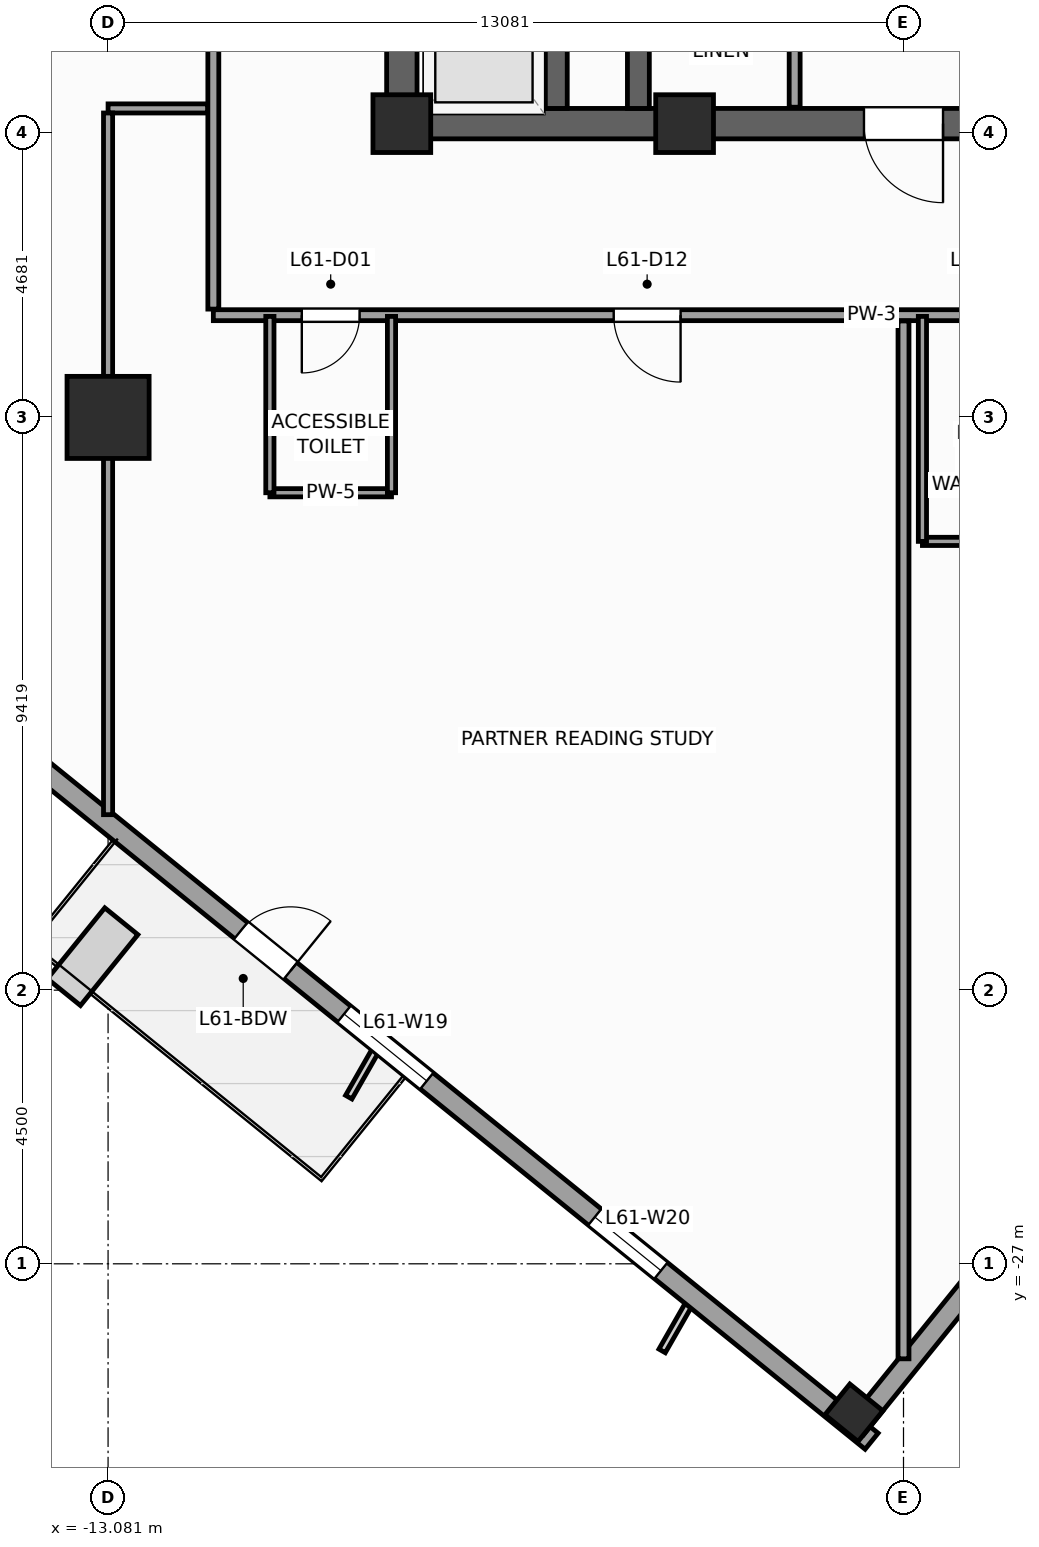
"""IFC4 building model, lengths in metres.
Left out: names, types, materials, properties, quantities, classifications, styles, units other than length and angle.
Written with IfcOpenShell. Run it as: python <this file> out.ifc"""

import sys

from ifc_helpers import new_model, si_unit, direction, frame, frame_2d, origin, origin_2d, place, context, subcontext, project, spatial, rectangle, extrude, source, transform, mapped, element, fill, save


model = new_model("IFC4")
c1 = context("Model", 3, precision=1e-05, world=origin(), true_north=direction((0.0, 1.0)))
c2 = subcontext(c1, "Body", "Model", "MODEL_VIEW")
j1 = project(units=[si_unit("LENGTHUNIT", "METRE"), si_unit("PLANEANGLEUNIT", "RADIAN")], contexts=[c1])
p1 = place(None, origin())
s1 = spatial("IfcSite", under=j1, at=p1, CompositionType="ELEMENT")
p2 = place(p1, origin())
s2 = spatial("IfcBuilding", under=s1, at=p2, CompositionType="ELEMENT")
p3 = place(p2, frame((0.0, 0.0, 252.4)))
s3 = spatial("IfcBuildingStorey", under=s2, at=p3, CompositionType="ELEMENT", Elevation=252.4)
p4 = place(p3, frame((-8.5, -8.25, 0.0), z_axis=(0.0, 0.0, 1.0), x_axis=(1.0, 0.0, 0.0)))
e1 = element("IfcWall", 1, at=p4, inside=s3, PredefinedType="SHEAR", context=c2, shape_type="SweptSolid", body=[
    extrude(rectangle(XDim=17.0, YDim=0.5, at=frame_2d((8.5, 0.0))), origin(), (0.0, 0.0, 1.0), 3.9),
])
p5 = place(p4, frame((7.85, 0.0, 0.0)))
e2 = element("IfcOpeningElement", 2, at=p5, cuts=e1, PredefinedType="OPENING", context=c2, shape_type="SweptSolid", body=[
    extrude(rectangle(XDim=1.3, YDim=2.2, at=frame_2d((0.65, 1.1))), frame((0.0, 0.26, 0.0), z_axis=(0.0, -1.0, 0.0), x_axis=(1.0, 0.0, 0.0)), (0.0, 0.0, 1.0), 0.52),
])
p6 = place(p3, frame((-8.25, -8.0, 0.0), z_axis=(0.0, 0.0, 1.0), x_axis=(0.0, 1.0, 0.0)))
e3 = element("IfcWall", 3, at=p6, inside=s3, PredefinedType="SHEAR", context=c2, shape_type="SweptSolid", body=[
    extrude(rectangle(XDim=16.0, YDim=0.5, at=frame_2d((8.0, 0.0))), origin(), (0.0, 0.0, 1.0), 3.9),
])
p7 = place(p6, frame((4.69, 0.0, 0.0)))
e4 = element("IfcOpeningElement", 4, at=p7, cuts=e3, PredefinedType="OPENING", context=c2, shape_type="SweptSolid", body=[
    extrude(rectangle(XDim=1.3, YDim=2.2, at=frame_2d((0.65, 1.1))), frame((0.0, 0.26, 0.0), z_axis=(0.0, -1.0, 0.0), x_axis=(1.0, 0.0, 0.0)), (0.0, 0.0, 1.0), 0.52),
])
p8 = place(p3, frame((-4.36, -8.0, 0.0), z_axis=(0.0, 0.0, 1.0), x_axis=(0.0, 1.0, 0.0)))
e5 = element("IfcWall", 5, at=p8, inside=s3, PredefinedType="SHEAR", context=c2, shape_type="SweptSolid", body=[
    extrude(rectangle(XDim=16.0, YDim=0.36, at=frame_2d((8.0, 0.0))), origin(), (0.0, 0.0, 1.0), 3.9),
])
p9 = place(p3, frame((-5.71, -8.0, 0.0), z_axis=(0.0, 0.0, 1.0), x_axis=(0.0, 1.0, 0.0)))
e6 = element("IfcWall", 6, at=p9, inside=s3, PredefinedType="SHEAR", context=c2, shape_type="SweptSolid", body=[
    extrude(rectangle(XDim=2.54, YDim=0.36, at=frame_2d((1.27, 0.0))), origin(), (0.0, 0.0, 1.0), 3.9),
])
m1 = source(origin(), c2, "Body", "SweptSolid", [
    extrude(rectangle(XDim=0.95, YDim=0.95, at=origin_2d()), origin(), (0.0, 0.0, 1.0), 3.9),
])
for number, where, z_axis, x_axis in (
    (7, (-8.25, -8.25, 0.0), (0.0, 0.0, 1.0), (1.0, 0.0, 0.0)),
    (8, (-3.6, -8.25, 0.0), (0.0, 0.0, 1.0), (1.0, 0.0, 0.0)),
):
    element("IfcColumn", number, at=place(p3, frame(where, z_axis=z_axis, x_axis=x_axis)), inside=s3, PredefinedType="PILASTER", context=c2, shape_type="MappedRepresentation", body=[
        mapped(m1, transform((0.0, 0.0, 0.0), scale=1.0)),
    ])
m2 = source(origin(), c2, "Body", "SweptSolid", [
    extrude(rectangle(XDim=1.35, YDim=1.35, at=origin_2d()), origin(), (0.0, 0.0, 1.0), 3.9),
])
p10 = place(p3, frame((-13.081, -13.081, 0.0), z_axis=(0.0, 0.0, 1.0), x_axis=(1.0, 0.0, 0.0)))
e9 = element("IfcColumn", 9, at=p10, inside=s3, PredefinedType="COLUMN", context=c2, shape_type="MappedRepresentation", body=[
    mapped(m2, transform((0.0, 0.0, 0.0), scale=1.0)),
])
m3 = source(origin(), c2, "Body", "SweptSolid", [
    extrude(rectangle(XDim=0.65, YDim=0.7, at=origin_2d()), origin(), (0.0, 0.0, 1.0), 3.9),
])
p11 = place(p3, frame((-0.815, -29.45, 0.0), z_axis=(0.0, 0.0, 1.0), x_axis=(0.62932039105, 0.777145961457, 0.0)))
e10 = element("IfcColumn", 10, at=p11, inside=s3, PredefinedType="COLUMN", context=c2, shape_type="MappedRepresentation", body=[
    mapped(m3, transform((0.0, 0.0, 0.0), scale=1.0)),
])
p12 = place(p3, frame((-29.154, -6.733, 0.0), z_axis=(0.0, 0.0, 1.0), x_axis=(0.77714192302, -0.629325378072, 0.0)))
e11 = element("IfcWall", 11, at=p12, inside=s3, PredefinedType="STANDARD", context=c2, shape_type="SweptSolid", body=[
    extrude(rectangle(XDim=36.84, YDim=0.34, at=frame_2d((18.42, 0.0))), origin(), (0.0, 0.0, 1.0), 2.96),
])
p13 = place(p12, frame((23.495, 0.0, 0.0)))
e12 = element("IfcOpeningElement", 12, at=p13, cuts=e11, PredefinedType="OPENING", context=c2, shape_type="SweptSolid", body=[
    extrude(rectangle(XDim=1.05, YDim=2.25, at=frame_2d((0.525, 1.125))), frame((0.0, 0.18, 0.0), z_axis=(0.0, -1.0, 0.0), x_axis=(1.0, 0.0, 0.0)), (0.0, 0.0, 1.0), 0.36),
])
p14 = place(p12, frame((3.721, 0.0, 0.48)))
e13 = element("IfcOpeningElement", 13, at=p14, cuts=e11, PredefinedType="OPENING", context=c2, shape_type="SweptSolid", body=[
    extrude(rectangle(XDim=1.4, YDim=2.4, at=frame_2d((0.7, 1.2))), frame((0.0, 0.18, 0.0), z_axis=(0.0, -1.0, 0.0), x_axis=(1.0, 0.0, 0.0)), (0.0, 0.0, 1.0), 0.36),
])
p15 = place(p12, frame((9.809, 0.0, 0.58)))
e14 = element("IfcOpeningElement", 14, at=p15, cuts=e11, PredefinedType="OPENING", context=c2, shape_type="SweptSolid", body=[
    extrude(rectangle(XDim=1.75, YDim=2.3, at=frame_2d((0.875, 1.15))), frame((0.0, 0.18, 0.0), z_axis=(0.0, -1.0, 0.0), x_axis=(1.0, 0.0, 0.0)), (0.0, 0.0, 1.0), 0.36),
])
p16 = place(p12, frame((16.058, 0.0, 0.58)))
e15 = element("IfcOpeningElement", 15, at=p16, cuts=e11, PredefinedType="OPENING", context=c2, shape_type="SweptSolid", body=[
    extrude(rectangle(XDim=1.75, YDim=2.3, at=frame_2d((0.875, 1.15))), frame((0.0, 0.18, 0.0), z_axis=(0.0, -1.0, 0.0), x_axis=(1.0, 0.0, 0.0)), (0.0, 0.0, 1.0), 0.36),
])
p17 = place(p12, frame((25.676, 0.0, 0.58)))
e16 = element("IfcOpeningElement", 16, at=p17, cuts=e11, PredefinedType="OPENING", context=c2, shape_type="SweptSolid", body=[
    extrude(rectangle(XDim=1.75, YDim=2.3, at=frame_2d((0.875, 1.15))), frame((0.0, 0.18, 0.0), z_axis=(0.0, -1.0, 0.0), x_axis=(1.0, 0.0, 0.0)), (0.0, 0.0, 1.0), 0.36),
])
p18 = place(p12, frame((30.982, 0.0, 0.48)))
e17 = element("IfcOpeningElement", 17, at=p18, cuts=e11, PredefinedType="OPENING", context=c2, shape_type="SweptSolid", body=[
    extrude(rectangle(XDim=1.4, YDim=2.4, at=frame_2d((0.7, 1.2))), frame((0.0, 0.18, 0.0), z_axis=(0.0, -1.0, 0.0), x_axis=(1.0, 0.0, 0.0)), (0.0, 0.0, 1.0), 0.36),
])
p19 = place(p3, frame((-0.789, -29.703, 0.0), z_axis=(0.0, 0.0, 1.0), x_axis=(0.629323365087, 0.77714355312, 0.0)))
e18 = element("IfcWall", 18, at=p19, inside=s3, PredefinedType="STANDARD", context=c2, shape_type="SweptSolid", body=[
    extrude(rectangle(XDim=5.5, YDim=0.34, at=frame_2d((2.75, 0.0))), origin(), (0.0, 0.0, 1.0), 3.66),
])
p20 = place(p3, frame((-1.79, -7.98, 0.0), z_axis=(0.0, 0.0, 1.0), x_axis=(0.0, 1.0, 0.0)))
e19 = element("IfcWall", 19, at=p20, inside=s3, PredefinedType="PARTITIONING", context=c2, shape_type="SweptSolid", body=[
    extrude(rectangle(XDim=12.38, YDim=0.18, at=frame_2d((6.19, 0.0))), origin(), (0.0, 0.0, 1.0), 3.66),
])
p21 = place(p20, frame((8.8, 0.0, 0.0)))
e20 = element("IfcOpeningElement", 20, at=p21, cuts=e19, PredefinedType="OPENING", context=c2, shape_type="SweptSolid", body=[
    extrude(rectangle(XDim=1.1, YDim=2.2, at=frame_2d((0.55, 1.1))), frame((0.0, 0.1, 0.0), z_axis=(0.0, -1.0, 0.0), x_axis=(1.0, 0.0, 0.0)), (0.0, 0.0, 1.0), 0.2),
])
p22 = place(p20, frame((10.86, 0.0, 0.0)))
e21 = element("IfcOpeningElement", 21, at=p22, cuts=e19, PredefinedType="OPENING", context=c2, shape_type="SweptSolid", body=[
    extrude(rectangle(XDim=1.1, YDim=2.2, at=frame_2d((0.55, 1.1))), frame((0.0, 0.1, 0.0), z_axis=(0.0, -1.0, 0.0), x_axis=(1.0, 0.0, 0.0)), (0.0, 0.0, 1.0), 0.2),
])
p23 = place(p20, frame((3.5, 0.0, 0.0)))
e22 = element("IfcOpeningElement", 22, at=p23, cuts=e19, PredefinedType="OPENING", context=c2, shape_type="SweptSolid", body=[
    extrude(rectangle(XDim=1.15, YDim=2.25, at=frame_2d((0.575, 1.125))), frame((0.0, 0.1, 0.0), z_axis=(0.0, -1.0, 0.0), x_axis=(1.0, 0.0, 0.0)), (0.0, 0.0, 1.0), 0.2),
])
p24 = place(p3, frame((-11.35, -11.4, 0.0), z_axis=(0.0, 0.0, 1.0), x_axis=(1.0, 0.0, 0.0)))
e23 = element("IfcWall", 23, at=p24, inside=s3, PredefinedType="PARTITIONING", context=c2, shape_type="SweptSolid", body=[
    extrude(rectangle(XDim=21.65, YDim=0.18, at=frame_2d((10.825, 0.0))), origin(), (0.0, 0.0, 1.0), 3.66),
])
p25 = place(p24, frame((1.455, 0.0, 0.0)))
e24 = element("IfcOpeningElement", 24, at=p25, cuts=e23, PredefinedType="OPENING", context=c2, shape_type="SweptSolid", body=[
    extrude(rectangle(XDim=0.95, YDim=2.1, at=frame_2d((0.475, 1.05))), frame((0.0, 0.1, 0.0), z_axis=(0.0, -1.0, 0.0), x_axis=(1.0, 0.0, 0.0)), (0.0, 0.0, 1.0), 0.2),
])
p26 = place(p24, frame((12.311, 0.0, 0.0)))
e25 = element("IfcOpeningElement", 25, at=p26, cuts=e23, PredefinedType="OPENING", context=c2, shape_type="SweptSolid", body=[
    extrude(rectangle(XDim=0.95, YDim=2.1, at=frame_2d((0.475, 1.05))), frame((0.0, 0.1, 0.0), z_axis=(0.0, -1.0, 0.0), x_axis=(1.0, 0.0, 0.0)), (0.0, 0.0, 1.0), 0.2),
])
p27 = place(p24, frame((17.06, 0.0, 0.0)))
e26 = element("IfcOpeningElement", 26, at=p27, cuts=e23, PredefinedType="OPENING", context=c2, shape_type="SweptSolid", body=[
    extrude(rectangle(XDim=1.1, YDim=2.2, at=frame_2d((0.55, 1.1))), frame((0.0, 0.1, 0.0), z_axis=(0.0, -1.0, 0.0), x_axis=(1.0, 0.0, 0.0)), (0.0, 0.0, 1.0), 0.2),
])
p28 = place(p24, frame((6.584, 0.0, 0.0)))
e27 = element("IfcOpeningElement", 27, at=p28, cuts=e23, PredefinedType="OPENING", context=c2, shape_type="SweptSolid", body=[
    extrude(rectangle(XDim=1.1, YDim=2.2, at=frame_2d((0.55, 1.1))), frame((0.0, 0.1, 0.0), z_axis=(0.0, -1.0, 0.0), x_axis=(1.0, 0.0, 0.0)), (0.0, 0.0, 1.0), 0.2),
])
p29 = place(p3, frame((-11.35, -11.3, 0.0), z_axis=(0.0, 0.0, 1.0), x_axis=(0.0, 1.0, 0.0)))
e28 = element("IfcWall", 28, at=p29, inside=s3, PredefinedType="PARTITIONING", context=c2, shape_type="SweptSolid", body=[
    extrude(rectangle(XDim=23.65, YDim=0.18, at=frame_2d((11.825, 0.0))), origin(), (0.0, 0.0, 1.0), 3.66),
])
p30 = place(p29, frame((13.1, 0.0, 0.0)))
e29 = element("IfcOpeningElement", 29, at=p30, cuts=e28, PredefinedType="OPENING", context=c2, shape_type="SweptSolid", body=[
    extrude(rectangle(XDim=1.1, YDim=2.2, at=frame_2d((0.55, 1.1))), frame((0.0, 0.1, 0.0), z_axis=(0.0, -1.0, 0.0), x_axis=(1.0, 0.0, 0.0)), (0.0, 0.0, 1.0), 0.2),
])
p31 = place(p29, frame((16.85, 0.0, 0.0)))
e30 = element("IfcOpeningElement", 30, at=p31, cuts=e28, PredefinedType="OPENING", context=c2, shape_type="SweptSolid", body=[
    extrude(rectangle(XDim=1.1, YDim=2.2, at=frame_2d((0.55, 1.1))), frame((0.0, 0.1, 0.0), z_axis=(0.0, -1.0, 0.0), x_axis=(1.0, 0.0, 0.0)), (0.0, 0.0, 1.0), 0.2),
])
p32 = place(p29, frame((5.0, 0.0, 0.0)))
e31 = element("IfcOpeningElement", 31, at=p32, cuts=e28, PredefinedType="OPENING", context=c2, shape_type="SweptSolid", body=[
    extrude(rectangle(XDim=1.1, YDim=2.2, at=frame_2d((0.55, 1.1))), frame((0.0, 0.1, 0.0), z_axis=(0.0, -1.0, 0.0), x_axis=(1.0, 0.0, 0.0)), (0.0, 0.0, 1.0), 0.2),
])
p33 = place(p29, frame((9.25, 0.0, 0.0)))
e32 = element("IfcOpeningElement", 32, at=p33, cuts=e28, PredefinedType="OPENING", context=c2, shape_type="SweptSolid", body=[
    extrude(rectangle(XDim=1.1, YDim=2.2, at=frame_2d((0.55, 1.1))), frame((0.0, 0.1, 0.0), z_axis=(0.0, -1.0, 0.0), x_axis=(1.0, 0.0, 0.0)), (0.0, 0.0, 1.0), 0.2),
])
p34 = place(p3, frame((0.0, -11.495, 0.0), z_axis=(0.0, 0.0, 1.0), x_axis=(0.0, -1.0, 0.0)))
e33 = element("IfcWall", 33, at=p34, inside=s3, PredefinedType="PARTITIONING", context=c2, shape_type="SweptSolid", body=[
    extrude(rectangle(XDim=17.067, YDim=0.18, at=frame_2d((8.534, 0.0))), origin(), (0.0, 0.0, 1.0), 3.66),
])
p35 = place(p3, frame((-11.445, -8.0, 0.0), z_axis=(0.0, 0.0, 1.0), x_axis=(-1.0, 0.0, 0.0)))
e34 = element("IfcWall", 34, at=p35, inside=s3, PredefinedType="PARTITIONING", context=c2, shape_type="SweptSolid", body=[
    extrude(rectangle(XDim=1.636, YDim=0.15, at=frame_2d((0.818, 0.0))), origin(), (0.0, 0.0, 1.0), 3.66),
])
p36 = place(p3, frame((-13.081, -8.075, 0.0), z_axis=(0.0, 0.0, 1.0), x_axis=(0.0, -1.0, 0.0)))
e35 = element("IfcWall", 35, at=p36, inside=s3, PredefinedType="PARTITIONING", context=c2, shape_type="SweptSolid", body=[
    extrude(rectangle(XDim=11.539, YDim=0.15, at=frame_2d((5.77, 0.0))), origin(), (0.0, 0.0, 1.0), 2.76),
])
p37 = place(p3, frame((-10.42, -14.32, 0.0), z_axis=(0.0, 0.0, 1.0), x_axis=(1.0, 0.0, 0.0)))
e36 = element("IfcWall", 36, at=p37, inside=s3, PredefinedType="PARTITIONING", context=c2, shape_type="SweptSolid", body=[
    extrude(rectangle(XDim=2.0, YDim=0.135, at=frame_2d((1.0, 0.0))), origin(), (0.0, 0.0, 1.0), 3.66),
])
for number, where, z_axis, x_axis in (
    (37, (-8.42, -14.32, 0.0), (0.0, 0.0, 1.0), (0.0, 1.0, 0.0)),
    (38, (-10.42, -14.32, 0.0), (0.0, 0.0, 1.0), (0.0, 1.0, 0.0)),
):
    element("IfcWall", number, at=place(p3, frame(where, z_axis=z_axis, x_axis=x_axis)), inside=s3, PredefinedType="PARTITIONING", context=c2, shape_type="SweptSolid", body=[
        extrude(rectangle(XDim=2.9, YDim=0.135, at=frame_2d((1.45, 0.0))), origin(), (0.0, 0.0, 1.0), 3.66),
    ])
p38 = place(p3, frame((0.311, -15.12, 0.0), z_axis=(0.0, 0.0, 1.0), x_axis=(1.0, 0.0, 0.0)))
e39 = element("IfcWall", 39, at=p38, inside=s3, PredefinedType="PARTITIONING", context=c2, shape_type="SweptSolid", body=[
    extrude(rectangle(XDim=2.25, YDim=0.135, at=frame_2d((1.125, 0.0))), origin(), (0.0, 0.0, 1.0), 3.66),
])
p39 = place(p3, frame((0.311, -15.12, 0.0), z_axis=(0.0, 0.0, 1.0), x_axis=(0.0, 1.0, 0.0)))
e40 = element("IfcWall", 40, at=p39, inside=s3, PredefinedType="PARTITIONING", context=c2, shape_type="SweptSolid", body=[
    extrude(rectangle(XDim=3.7, YDim=0.135, at=frame_2d((1.85, 0.0))), origin(), (0.0, 0.0, 1.0), 3.66),
])
m4 = source(origin(), c2, "Body", "SweptSolid", [
    extrude(rectangle(XDim=1.05, YDim=2.25, at=frame_2d((0.525, 1.125))), frame((0.0, 0.025, 0.0), z_axis=(0.0, -1.0, 0.0), x_axis=(1.0, 0.0, 0.0)), (0.0, 0.0, 1.0), 0.05),
])
p40 = place(p13, origin())
e41 = element("IfcDoor", 41, at=p40, inside=s3, OperationType="SINGLE_SWING_RIGHT", PredefinedType="DOOR", context=c2, shape_type="MappedRepresentation", body=[
    mapped(m4, transform((0.0, 0.0, 0.0), scale=1.0)),
])
fill(e12, e41)
m5 = source(origin(), c2, "Body", "SweptSolid", [
    extrude(rectangle(XDim=1.75, YDim=2.3, at=frame_2d((0.875, 1.15))), frame((0.0, 0.03, 0.0), z_axis=(0.0, -1.0, 0.0), x_axis=(1.0, 0.0, 0.0)), (0.0, 0.0, 1.0), 0.06),
])
p41 = place(p17, origin())
e42 = element("IfcWindow", 42, at=p41, inside=s3, PartitioningType="SINGLE_PANEL", PredefinedType="WINDOW", context=c2, shape_type="MappedRepresentation", body=[
    mapped(m5, transform((0.0, 0.0, 0.0), scale=1.0)),
])
fill(e16, e42)
m6 = source(origin(), c2, "Body", "SweptSolid", [
    extrude(rectangle(XDim=1.4, YDim=2.4, at=frame_2d((0.7, 1.2))), frame((0.0, 0.03, 0.0), z_axis=(0.0, -1.0, 0.0), x_axis=(1.0, 0.0, 0.0)), (0.0, 0.0, 1.0), 0.06),
])
p42 = place(p18, origin())
e43 = element("IfcWindow", 43, at=p42, inside=s3, PartitioningType="SINGLE_PANEL", PredefinedType="WINDOW", context=c2, shape_type="MappedRepresentation", body=[
    mapped(m6, transform((0.0, 0.0, 0.0), scale=1.0)),
])
fill(e17, e43)
m7 = source(origin(), c2, "Body", "SweptSolid", [
    extrude(rectangle(XDim=1.3, YDim=2.2, at=frame_2d((0.65, 1.1))), frame((0.0, 0.025, 0.0), z_axis=(0.0, -1.0, 0.0), x_axis=(1.0, 0.0, 0.0)), (0.0, 0.0, 1.0), 0.05),
])
p43 = place(p5, frame((1.3, 0.0, 0.0), z_axis=(0.0, 0.0, 1.0), x_axis=(-1.0, 0.0, 0.0)))
e44 = element("IfcDoor", 44, at=p43, inside=s3, OperationType="SINGLE_SWING_RIGHT", PredefinedType="DOOR", context=c2, shape_type="MappedRepresentation", body=[
    mapped(m7, transform((0.0, 0.0, 0.0), scale=1.0)),
])
fill(e2, e44)
m8 = source(origin(), c2, "Body", "SweptSolid", [
    extrude(rectangle(XDim=0.95, YDim=2.1, at=frame_2d((0.475, 1.05))), frame((0.0, 0.025, 0.0), z_axis=(0.0, -1.0, 0.0), x_axis=(1.0, 0.0, 0.0)), (0.0, 0.0, 1.0), 0.05),
])
p44 = place(p25, frame((0.95, 0.0, 0.0), z_axis=(0.0, 0.0, 1.0), x_axis=(-1.0, 0.0, 0.0)))
e45 = element("IfcDoor", 45, at=p44, inside=s3, OperationType="SINGLE_SWING_LEFT", PredefinedType="DOOR", context=c2, shape_type="MappedRepresentation", body=[
    mapped(m8, transform((0.0, 0.0, 0.0), scale=1.0)),
])
fill(e24, e45)
m9 = source(origin(), c2, "Body", "SweptSolid", [
    extrude(rectangle(XDim=1.1, YDim=2.2, at=frame_2d((0.55, 1.1))), frame((0.0, 0.025, 0.0), z_axis=(0.0, -1.0, 0.0), x_axis=(1.0, 0.0, 0.0)), (0.0, 0.0, 1.0), 0.05),
])
p45 = place(p28, frame((1.1, 0.0, 0.0), z_axis=(0.0, 0.0, 1.0), x_axis=(-1.0, 0.0, 0.0)))
e46 = element("IfcDoor", 46, at=p45, inside=s3, OperationType="SINGLE_SWING_RIGHT", PredefinedType="DOOR", context=c2, shape_type="MappedRepresentation", body=[
    mapped(m9, transform((0.0, 0.0, 0.0), scale=1.0)),
])
fill(e27, e46)
save(model, sys.argv[1])
